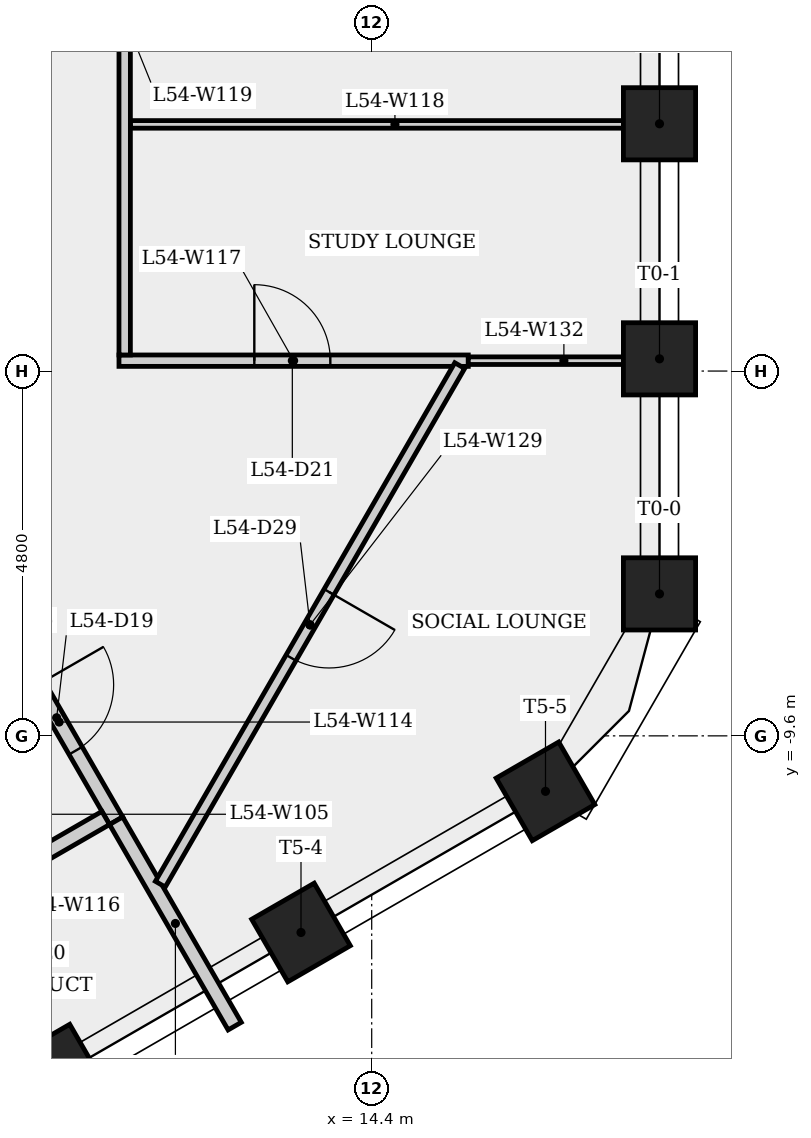
"""IFC4 building model, lengths in metres.
Left out: names, types, materials, properties, quantities, classifications, styles, units other than length and angle.
Written with IfcOpenShell. Run it as: python <this file> out.ifc"""

import sys

from ifc_helpers import new_model, si_unit, direction, frame, frame_2d, origin, origin_2d, place, context, subcontext, project, spatial, rectangle, extrude, element, fill, save


model = new_model("IFC4")
c1 = context("Model", 3, precision=1e-05, world=origin(), true_north=direction((0.0, 1.0)))
c2 = subcontext(c1, "Body", "Model", "MODEL_VIEW")
j1 = project(units=[si_unit("LENGTHUNIT", "METRE"), si_unit("PLANEANGLEUNIT", "RADIAN")], contexts=[c1])
p1 = place(None, origin())
s1 = spatial("IfcSite", under=j1, at=p1, CompositionType="ELEMENT")
p2 = place(p1, origin())
s2 = spatial("IfcBuilding", under=s1, at=p2, CompositionType="ELEMENT")
p3 = place(p2, frame((0.0, 0.0, 202.1)))
s3 = spatial("IfcBuildingStorey", under=s2, at=p3, CompositionType="ELEMENT", Elevation=202.1)
for number, where, z_axis, x_axis in (
    (1, (18.187, -7.732, 0.0), (0.0, 0.0, 1.0), (1.0, 0.0, 0.0)),
    (2, (18.187, -4.639, 0.0), (0.0, 0.0, 1.0), (1.0, 0.0, 0.0)),
    (3, (18.187, -1.546, 0.0), (0.0, 0.0, 1.0), (1.0, 0.0, 0.0)),
    (4, (10.253, -14.044, 0.0), (0.0, 0.0, 1.0), (0.5, -0.866, 0.0)),
    (5, (13.47, -12.187, 0.0), (0.0, 0.0, 1.0), (0.5, -0.866, 0.0)),
    (6, (16.687, -10.33, 0.0), (0.0, 0.0, 1.0), (0.5, -0.866, 0.0)),
):
    element("IfcColumn", number, at=place(p3, frame(where, z_axis=z_axis, x_axis=x_axis)), inside=s3, PredefinedType="COLUMN", context=c2, shape_type="SweptSolid", body=[
        extrude(rectangle(XDim=0.95, YDim=0.95, at=origin_2d()), origin(), (0.0, 0.0, 1.0), 4.0),
    ])
p4 = place(p3, frame((9.537, -8.119, 0.0), z_axis=(0.0, 0.0, 1.0), x_axis=(0.499990139034, -0.866031096941, 0.0)))
e7 = element("IfcWall", 7, at=p4, inside=s3, PredefinedType="PARTITIONING", context=c2, shape_type="SweptSolid", body=[
    extrude(rectangle(XDim=3.0, YDim=0.2, at=frame_2d((1.5, 0.0))), origin(), (0.0, 0.0, 1.0), 3.6),
])
p5 = place(p4, frame((0.935, 0.0, 0.0)))
e8 = element("IfcOpeningElement", 8, at=p5, cuts=e7, PredefinedType="OPENING", context=c2, shape_type="SweptSolid", body=[
    extrude(rectangle(XDim=1.0, YDim=2.1, at=frame_2d((0.5, 1.05))), frame((0.0, 0.11, 0.0), z_axis=(0.0, -1.0, 0.0), x_axis=(1.0, 0.0, 0.0)), (0.0, 0.0, 1.0), 0.22),
])
p6 = place(p3, frame((11.037, -10.717, 0.0), z_axis=(0.0, 0.0, 1.0), x_axis=(0.499993381564, -0.866029224906, 0.0)))
e9 = element("IfcWall", 9, at=p6, inside=s3, PredefinedType="PLUMBINGWALL", context=c2, shape_type="SweptSolid", body=[
    extrude(rectangle(XDim=3.12, YDim=0.2, at=frame_2d((1.56, 0.0))), origin(), (0.0, 0.0, 1.0), 3.6),
])
p7 = place(p3, frame((10.901, -10.681, 0.0), z_axis=(0.0, 0.0, 1.0), x_axis=(-0.866007538022, -0.500030943131, 0.0)))
e10 = element("IfcWall", 10, at=p7, inside=s3, PredefinedType="PLUMBINGWALL", context=c2, shape_type="SweptSolid", body=[
    extrude(rectangle(XDim=2.375, YDim=0.2, at=frame_2d((1.188, 0.0))), origin(), (0.0, 0.0, 1.0), 3.6),
])
p8 = place(p3, frame((11.075, -4.663, 0.0), z_axis=(0.0, 0.0, 1.0), x_axis=(1.0, 0.0, 0.0)))
e11 = element("IfcWall", 11, at=p8, inside=s3, PredefinedType="PARTITIONING", context=c2, shape_type="SweptSolid", body=[
    extrude(rectangle(XDim=4.596, YDim=0.15, at=frame_2d((2.298, 0.0))), origin(), (0.0, 0.0, 1.0), 3.6),
])
p9 = place(p8, frame((1.781, 0.0, 0.0)))
e12 = element("IfcOpeningElement", 12, at=p9, cuts=e11, PredefinedType="OPENING", context=c2, shape_type="SweptSolid", body=[
    extrude(rectangle(XDim=1.0, YDim=2.1, at=frame_2d((0.5, 1.05))), frame((0.0, 0.085, 0.0), z_axis=(0.0, -1.0, 0.0), x_axis=(1.0, 0.0, 0.0)), (0.0, 0.0, 1.0), 0.17),
])
p10 = place(p3, frame((11.225, -1.554, 0.0), z_axis=(0.0, 0.0, 1.0), x_axis=(1.0, 0.0, 0.0)))
e13 = element("IfcWall", 13, at=p10, inside=s3, PredefinedType="PARTITIONING", context=c2, shape_type="SweptSolid", body=[
    extrude(rectangle(XDim=6.961, YDim=0.1, at=frame_2d((3.481, 0.0))), origin(), (0.0, 0.0, 1.0), 3.6),
])
p11 = place(p3, frame((11.15, -4.588, 0.0), z_axis=(0.0, 0.0, 1.0), x_axis=(0.0, 1.0, 0.0)))
e14 = element("IfcWall", 14, at=p11, inside=s3, PredefinedType="PARTITIONING", context=c2, shape_type="SweptSolid", body=[
    extrude(rectangle(XDim=8.877, YDim=0.15, at=frame_2d((4.438, 0.0))), origin(), (0.0, 0.0, 1.0), 3.6),
])
p12 = place(p11, frame((4.088, 0.0, 0.0)))
e15 = element("IfcOpeningElement", 15, at=p12, cuts=e14, PredefinedType="OPENING", context=c2, shape_type="SweptSolid", body=[
    extrude(rectangle(XDim=1.0, YDim=2.1, at=frame_2d((0.5, 1.05))), frame((0.0, 0.085, 0.0), z_axis=(0.0, -1.0, 0.0), x_axis=(1.0, 0.0, 0.0)), (0.0, 0.0, 1.0), 0.17),
])
p13 = place(p3, frame((15.558, -4.728, 0.0), z_axis=(0.0, 0.0, 1.0), x_axis=(-0.500004989119, -0.866022523296, 0.0)))
e16 = element("IfcWall", 16, at=p13, inside=s3, PredefinedType="PARTITIONING", context=c2, shape_type="SweptSolid", body=[
    extrude(rectangle(XDim=7.879, YDim=0.15, at=frame_2d((3.939, 0.0))), origin(), (0.0, 0.0, 1.0), 3.6),
])
p14 = place(p13, frame((3.439, 0.0, 0.0)))
e17 = element("IfcOpeningElement", 17, at=p14, cuts=e16, PredefinedType="OPENING", context=c2, shape_type="SweptSolid", body=[
    extrude(rectangle(XDim=1.0, YDim=2.1, at=frame_2d((0.5, 1.05))), frame((0.0, 0.085, 0.0), z_axis=(0.0, -1.0, 0.0), x_axis=(1.0, 0.0, 0.0)), (0.0, 0.0, 1.0), 0.17),
])
p15 = place(p3, frame((18.187, -4.663, 0.0), z_axis=(0.0, 0.0, 1.0), x_axis=(-1.0, 0.0, 0.0)))
e18 = element("IfcWall", 18, at=p15, inside=s3, PredefinedType="PARTITIONING", context=c2, shape_type="SweptSolid", body=[
    extrude(rectangle(XDim=2.516, YDim=0.1, at=frame_2d((1.258, 0.0))), origin(), (0.0, 0.0, 1.0), 3.6),
])
p16 = place(p5, origin())
e19 = element("IfcDoor", 19, at=p16, inside=s3, OperationType="SINGLE_SWING_LEFT", PredefinedType="DOOR", context=c2, shape_type="SweptSolid", body=[
    extrude(rectangle(XDim=1.0, YDim=2.1, at=frame_2d((0.5, 1.05))), frame((0.0, 0.025, 0.0), z_axis=(0.0, -1.0, 0.0), x_axis=(1.0, 0.0, 0.0)), (0.0, 0.0, 1.0), 0.05),
])
fill(e8, e19)
p17 = place(p9, origin())
e20 = element("IfcDoor", 20, at=p17, inside=s3, OperationType="SINGLE_SWING_LEFT", PredefinedType="DOOR", context=c2, shape_type="SweptSolid", body=[
    extrude(rectangle(XDim=1.0, YDim=2.1, at=frame_2d((0.5, 1.05))), frame((0.0, 0.025, 0.0), z_axis=(0.0, -1.0, 0.0), x_axis=(1.0, 0.0, 0.0)), (0.0, 0.0, 1.0), 0.05),
])
fill(e12, e20)
p18 = place(p14, origin())
e21 = element("IfcDoor", 21, at=p18, inside=s3, OperationType="SINGLE_SWING_LEFT", PredefinedType="DOOR", context=c2, shape_type="SweptSolid", body=[
    extrude(rectangle(XDim=1.0, YDim=2.1, at=frame_2d((0.5, 1.05))), frame((0.0, 0.025, 0.0), z_axis=(0.0, -1.0, 0.0), x_axis=(1.0, 0.0, 0.0)), (0.0, 0.0, 1.0), 0.05),
])
fill(e17, e21)
save(model, sys.argv[1])
